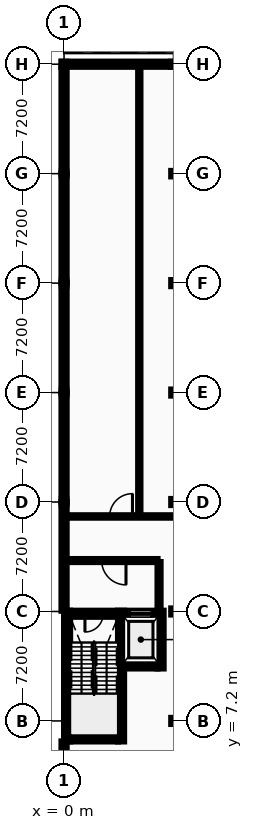
"""IFC4 building model, lengths in metres.
Left out: names, types, materials, properties, quantities, classifications, styles, units other than length and angle.
Written with IfcOpenShell. Run it as: python <this file> out.ifc"""

import sys

from ifc_helpers import new_model, si_unit, direction, frame, frame_2d, origin, origin_2d, place, context, subcontext, project, spatial, rectangle, i_section, extrude, element, fill, save


model = new_model("IFC4")
c1 = context("Model", 3, precision=1e-05, world=origin(), true_north=direction((0.0, 1.0)))
c2 = subcontext(c1, "Body", "Model", "MODEL_VIEW")
j1 = project(units=[si_unit("LENGTHUNIT", "METRE"), si_unit("PLANEANGLEUNIT", "RADIAN")], contexts=[c1])
p1 = place(None, origin())
s1 = spatial("IfcSite", under=j1, at=p1, CompositionType="ELEMENT")
p2 = place(p1, origin())
s2 = spatial("IfcBuilding", under=s1, at=p2, CompositionType="ELEMENT")
p3 = place(p2, frame((0.0, 0.0, 14.0)))
s3 = spatial("IfcBuildingStorey", under=s2, at=p3, CompositionType="ELEMENT", Elevation=14.0)
for number, where, z_axis, x_axis in (
    (1, (0.0, 21.6, 0.0), (0.0, 0.0, 1.0), (1.0, 0.0, 0.0)),
    (2, (0.0, 28.8, 0.0), (0.0, 0.0, 1.0), (1.0, 0.0, 0.0)),
    (3, (0.0, 36.0, 0.0), (0.0, 0.0, 1.0), (1.0, 0.0, 0.0)),
):
    element("IfcColumn", number, at=place(p3, frame(where, z_axis=z_axis, x_axis=x_axis)), inside=s3, PredefinedType="COLUMN", context=c2, shape_type="SweptSolid", body=[
        extrude(i_section(OverallWidth=0.3, OverallDepth=0.4, WebThickness=0.013, FlangeThickness=0.024, FilletRadius=0.027, at=origin_2d()), origin(), (0.0, 0.0, 1.0), 4.4),
    ])
p4 = place(p3, frame((0.0, 43.2, 0.0), z_axis=(0.0, 0.0, 1.0), x_axis=(1.0, 0.0, 0.0)))
e4 = element("IfcColumn", 4, at=p4, inside=s3, PredefinedType="COLUMN", context=c2, shape_type="SweptSolid", body=[
    extrude(i_section(OverallWidth=0.3, OverallDepth=0.36, WebThickness=0.012, FlangeThickness=0.022, FilletRadius=0.027, at=origin_2d()), origin(), (0.0, 0.0, 1.0), 4.4),
])
p5 = place(p3, frame((0.0, 50.4, 0.0), z_axis=(0.0, 0.0, 1.0), x_axis=(1.0, 0.0, 0.0)))
e5 = element("IfcColumn", 5, at=p5, inside=s3, PredefinedType="COLUMN", context=c2, shape_type="SweptSolid", body=[
    extrude(i_section(OverallWidth=0.3, OverallDepth=0.32, WebThickness=0.011, FlangeThickness=0.021, FilletRadius=0.027, at=origin_2d()), origin(), (0.0, 0.0, 1.0), 4.4),
])
for number, where, z_axis, x_axis in (
    (6, (7.2, 7.2, 0.0), (0.0, 0.0, 1.0), (1.0, 0.0, 0.0)),
    (7, (7.2, 14.4, 0.0), (0.0, 0.0, 1.0), (1.0, 0.0, 0.0)),
    (8, (7.2, 21.6, 0.0), (0.0, 0.0, 1.0), (1.0, 0.0, 0.0)),
    (9, (7.2, 28.8, 0.0), (0.0, 0.0, 1.0), (1.0, 0.0, 0.0)),
    (10, (7.2, 36.0, 0.0), (0.0, 0.0, 1.0), (1.0, 0.0, 0.0)),
):
    element("IfcColumn", number, at=place(p3, frame(where, z_axis=z_axis, x_axis=x_axis)), inside=s3, PredefinedType="COLUMN", context=c2, shape_type="SweptSolid", body=[
        extrude(i_section(OverallWidth=0.3, OverallDepth=0.4, WebThickness=0.013, FlangeThickness=0.024, FilletRadius=0.027, at=origin_2d()), origin(), (0.0, 0.0, 1.0), 4.4),
    ])
p6 = place(p3, frame((7.2, 43.2, 0.0), z_axis=(0.0, 0.0, 1.0), x_axis=(1.0, 0.0, 0.0)))
e11 = element("IfcColumn", 11, at=p6, inside=s3, PredefinedType="COLUMN", context=c2, shape_type="SweptSolid", body=[
    extrude(i_section(OverallWidth=0.3, OverallDepth=0.36, WebThickness=0.012, FlangeThickness=0.022, FilletRadius=0.027, at=origin_2d()), origin(), (0.0, 0.0, 1.0), 4.4),
])
p7 = place(p3, frame((7.2, 50.4, 0.0), z_axis=(0.0, 0.0, 1.0), x_axis=(1.0, 0.0, 0.0)))
e12 = element("IfcColumn", 12, at=p7, inside=s3, PredefinedType="COLUMN", context=c2, shape_type="SweptSolid", body=[
    extrude(i_section(OverallWidth=0.3, OverallDepth=0.32, WebThickness=0.011, FlangeThickness=0.021, FilletRadius=0.027, at=origin_2d()), origin(), (0.0, 0.0, 1.0), 4.4),
])
p8 = place(p3, frame((7.31, 50.4, 0.0), z_axis=(0.0, 0.0, 1.0), x_axis=(-1.0, 0.0, 0.0)))
e13 = element("IfcWall", 13, at=p8, inside=s3, PredefinedType="STANDARD", context=c2, shape_type="SweptSolid", body=[
    extrude(rectangle(XDim=7.48, YDim=0.34, at=frame_2d((3.74, 0.0))), origin(), (0.0, 0.0, 1.0), 3.935),
])
p9 = place(p8, frame((4.619, 0.0, 0.95)))
e14 = element("IfcOpeningElement", 14, at=p9, cuts=e13, PredefinedType="OPENING", context=c2, shape_type="SweptSolid", body=[
    extrude(rectangle(XDim=1.234, YDim=1.332, at=frame_2d((0.617, 0.666))), frame((0.0, 0.18, 0.0), z_axis=(0.0, -1.0, 0.0), x_axis=(1.0, 0.0, 0.0)), (0.0, 0.0, 1.0), 0.36),
])
p10 = place(p3, frame((0.0, 5.85, 0.0), z_axis=(0.0, 0.0, 1.0), x_axis=(0.0, -1.0, 0.0)))
e15 = element("IfcWall", 15, at=p10, inside=s3, PredefinedType="STANDARD", context=c2, shape_type="SweptSolid", body=[
    extrude(rectangle(XDim=5.68, YDim=0.34, at=frame_2d((2.84, 0.0))), origin(), (0.0, 0.0, 1.0), 4.2),
])
p11 = place(p10, frame((2.41, 0.0, 0.95)))
e16 = element("IfcOpeningElement", 16, at=p11, cuts=e15, PredefinedType="OPENING", context=c2, shape_type="SweptSolid", body=[
    extrude(rectangle(XDim=0.86, YDim=1.368, at=frame_2d((0.43, 0.684))), frame((0.0, 0.18, 0.0), z_axis=(0.0, -1.0, 0.0), x_axis=(1.0, 0.0, 0.0)), (0.0, 0.0, 1.0), 0.36),
])
p12 = place(p3, frame((0.0, 21.6, 0.0), z_axis=(0.0, 0.0, 1.0), x_axis=(0.0, -1.0, 0.0)))
e17 = element("IfcWall", 17, at=p12, inside=s3, PredefinedType="STANDARD", context=c2, shape_type="SweptSolid", body=[
    extrude(rectangle(XDim=7.15, YDim=0.34, at=frame_2d((3.575, 0.0))), origin(), (0.0, 0.0, 1.0), 4.2),
])
p13 = place(p12, frame((1.698, 0.0, 0.95)))
e18 = element("IfcOpeningElement", 18, at=p13, cuts=e17, PredefinedType="OPENING", context=c2, shape_type="SweptSolid", body=[
    extrude(rectangle(XDim=0.894, YDim=1.368, at=frame_2d((0.447, 0.684))), frame((0.0, 0.18, 0.0), z_axis=(0.0, -1.0, 0.0), x_axis=(1.0, 0.0, 0.0)), (0.0, 0.0, 1.0), 0.36),
])
p14 = place(p12, frame((4.558, 0.0, 0.95)))
e19 = element("IfcOpeningElement", 19, at=p14, cuts=e17, PredefinedType="OPENING", context=c2, shape_type="SweptSolid", body=[
    extrude(rectangle(XDim=0.894, YDim=1.368, at=frame_2d((0.447, 0.684))), frame((0.0, 0.18, 0.0), z_axis=(0.0, -1.0, 0.0), x_axis=(1.0, 0.0, 0.0)), (0.0, 0.0, 1.0), 0.36),
])
p15 = place(p3, frame((0.0, 28.8, 0.0), z_axis=(0.0, 0.0, 1.0), x_axis=(0.0, -1.0, 0.0)))
e20 = element("IfcWall", 20, at=p15, inside=s3, PredefinedType="STANDARD", context=c2, shape_type="SweptSolid", body=[
    extrude(rectangle(XDim=7.2, YDim=0.34, at=frame_2d((3.6, 0.0))), origin(), (0.0, 0.0, 1.0), 3.885),
])
p16 = place(p15, frame((1.696, 0.0, 0.95)))
e21 = element("IfcOpeningElement", 21, at=p16, cuts=e20, PredefinedType="OPENING", context=c2, shape_type="SweptSolid", body=[
    extrude(rectangle(XDim=0.928, YDim=1.368, at=frame_2d((0.464, 0.684))), frame((0.0, 0.18, 0.0), z_axis=(0.0, -1.0, 0.0), x_axis=(1.0, 0.0, 0.0)), (0.0, 0.0, 1.0), 0.36),
])
p17 = place(p15, frame((4.576, 0.0, 0.95)))
e22 = element("IfcOpeningElement", 22, at=p17, cuts=e20, PredefinedType="OPENING", context=c2, shape_type="SweptSolid", body=[
    extrude(rectangle(XDim=0.928, YDim=1.368, at=frame_2d((0.464, 0.684))), frame((0.0, 0.18, 0.0), z_axis=(0.0, -1.0, 0.0), x_axis=(1.0, 0.0, 0.0)), (0.0, 0.0, 1.0), 0.36),
])
p18 = place(p3, frame((0.0, 36.0, 0.0), z_axis=(0.0, 0.0, 1.0), x_axis=(0.0, -1.0, 0.0)))
e23 = element("IfcWall", 23, at=p18, inside=s3, PredefinedType="STANDARD", context=c2, shape_type="SweptSolid", body=[
    extrude(rectangle(XDim=7.2, YDim=0.34, at=frame_2d((3.6, 0.0))), origin(), (0.0, 0.0, 1.0), 3.885),
])
p19 = place(p18, frame((1.679, 0.0, 0.95)))
e24 = element("IfcOpeningElement", 24, at=p19, cuts=e23, PredefinedType="OPENING", context=c2, shape_type="SweptSolid", body=[
    extrude(rectangle(XDim=0.962, YDim=1.368, at=frame_2d((0.481, 0.684))), frame((0.0, 0.18, 0.0), z_axis=(0.0, -1.0, 0.0), x_axis=(1.0, 0.0, 0.0)), (0.0, 0.0, 1.0), 0.36),
])
p20 = place(p18, frame((4.559, 0.0, 0.95)))
e25 = element("IfcOpeningElement", 25, at=p20, cuts=e23, PredefinedType="OPENING", context=c2, shape_type="SweptSolid", body=[
    extrude(rectangle(XDim=0.962, YDim=1.368, at=frame_2d((0.481, 0.684))), frame((0.0, 0.18, 0.0), z_axis=(0.0, -1.0, 0.0), x_axis=(1.0, 0.0, 0.0)), (0.0, 0.0, 1.0), 0.36),
])
p21 = place(p3, frame((0.0, 43.2, 0.0), z_axis=(0.0, 0.0, 1.0), x_axis=(0.0, -1.0, 0.0)))
e26 = element("IfcWall", 26, at=p21, inside=s3, PredefinedType="STANDARD", context=c2, shape_type="SweptSolid", body=[
    extrude(rectangle(XDim=7.2, YDim=0.34, at=frame_2d((3.6, 0.0))), origin(), (0.0, 0.0, 1.0), 3.885),
])
p22 = place(p21, frame((1.662, 0.0, 0.95)))
e27 = element("IfcOpeningElement", 27, at=p22, cuts=e26, PredefinedType="OPENING", context=c2, shape_type="SweptSolid", body=[
    extrude(rectangle(XDim=0.996, YDim=1.368, at=frame_2d((0.498, 0.684))), frame((0.0, 0.18, 0.0), z_axis=(0.0, -1.0, 0.0), x_axis=(1.0, 0.0, 0.0)), (0.0, 0.0, 1.0), 0.36),
])
p23 = place(p21, frame((4.542, 0.0, 0.95)))
e28 = element("IfcOpeningElement", 28, at=p23, cuts=e26, PredefinedType="OPENING", context=c2, shape_type="SweptSolid", body=[
    extrude(rectangle(XDim=0.996, YDim=1.368, at=frame_2d((0.498, 0.684))), frame((0.0, 0.18, 0.0), z_axis=(0.0, -1.0, 0.0), x_axis=(1.0, 0.0, 0.0)), (0.0, 0.0, 1.0), 0.36),
])
p24 = place(p3, frame((0.0, 50.23, 0.0), z_axis=(0.0, 0.0, 1.0), x_axis=(0.0, -1.0, 0.0)))
e29 = element("IfcWall", 29, at=p24, inside=s3, PredefinedType="STANDARD", context=c2, shape_type="SweptSolid", body=[
    extrude(rectangle(XDim=7.03, YDim=0.34, at=frame_2d((3.515, 0.0))), origin(), (0.0, 0.0, 1.0), 3.885),
])
p25 = place(p24, frame((1.594, 0.0, 0.95)))
e30 = element("IfcOpeningElement", 30, at=p25, cuts=e29, PredefinedType="OPENING", context=c2, shape_type="SweptSolid", body=[
    extrude(rectangle(XDim=1.03, YDim=1.368, at=frame_2d((0.515, 0.684))), frame((0.0, 0.18, 0.0), z_axis=(0.0, -1.0, 0.0), x_axis=(1.0, 0.0, 0.0)), (0.0, 0.0, 1.0), 0.36),
])
p26 = place(p24, frame((4.406, 0.0, 0.95)))
e31 = element("IfcOpeningElement", 31, at=p26, cuts=e29, PredefinedType="OPENING", context=c2, shape_type="SweptSolid", body=[
    extrude(rectangle(XDim=1.03, YDim=1.368, at=frame_2d((0.515, 0.684))), frame((0.0, 0.18, 0.0), z_axis=(0.0, -1.0, 0.0), x_axis=(1.0, 0.0, 0.0)), (0.0, 0.0, 1.0), 0.36),
])
p27 = place(p3, frame((0.4, 6.05, 0.0), z_axis=(0.0, 0.0, 1.0), x_axis=(1.0, 0.0, 0.0)))
e32 = element("IfcWall", 32, at=p27, inside=s3, PredefinedType="SHEAR", context=c2, shape_type="SweptSolid", body=[
    extrude(rectangle(XDim=3.15, YDim=0.4, at=frame_2d((1.575, 0.0))), origin(), (0.0, 0.0, 1.0), 4.2),
])
p28 = place(p3, frame((0.4, 14.25, 0.0), z_axis=(0.0, 0.0, 1.0), x_axis=(1.0, 0.0, 0.0)))
e33 = element("IfcWall", 33, at=p28, inside=s3, PredefinedType="SHEAR", context=c2, shape_type="SweptSolid", body=[
    extrude(rectangle(XDim=3.15, YDim=0.4, at=frame_2d((1.575, 0.0))), origin(), (0.0, 0.0, 1.0), 4.2),
])
p29 = place(p28, frame((0.975, 0.0, 0.0)))
e34 = element("IfcOpeningElement", 34, at=p29, cuts=e33, PredefinedType="OPENING", context=c2, shape_type="SweptSolid", body=[
    extrude(rectangle(XDim=1.2, YDim=2.15, at=frame_2d((0.6, 1.075))), frame((0.0, 0.21, 0.0), z_axis=(0.0, -1.0, 0.0), x_axis=(1.0, 0.0, 0.0)), (0.0, 0.0, 1.0), 0.42),
])
for number, where, z_axis, x_axis in (
    (35, (0.2, 5.85, 0.0), (0.0, 0.0, 1.0), (0.0, 1.0, 0.0)),
    (36, (3.75, 5.85, 0.0), (0.0, 0.0, 1.0), (0.0, 1.0, 0.0)),
):
    element("IfcWall", number, at=place(p3, frame(where, z_axis=z_axis, x_axis=x_axis)), inside=s3, PredefinedType="SHEAR", context=c2, shape_type="SweptSolid", body=[
        extrude(rectangle(XDim=8.6, YDim=0.4, at=frame_2d((4.3, 0.0))), origin(), (0.0, 0.0, 1.0), 4.2),
    ])
p30 = place(p3, frame((3.95, 10.85, 0.0), z_axis=(0.0, 0.0, 1.0), x_axis=(1.0, 0.0, 0.0)))
e37 = element("IfcWall", 37, at=p30, inside=s3, PredefinedType="SHEAR", context=c2, shape_type="SweptSolid", body=[
    extrude(rectangle(XDim=2.2, YDim=0.4, at=frame_2d((1.1, 0.0))), origin(), (0.0, 0.0, 1.0), 4.2),
])
p31 = place(p3, frame((3.95, 14.25, 0.0), z_axis=(0.0, 0.0, 1.0), x_axis=(1.0, 0.0, 0.0)))
e38 = element("IfcWall", 38, at=p31, inside=s3, PredefinedType="SHEAR", context=c2, shape_type="SweptSolid", body=[
    extrude(rectangle(XDim=2.2, YDim=0.4, at=frame_2d((1.1, 0.0))), origin(), (0.0, 0.0, 1.0), 4.2),
])
p32 = place(p31, frame((0.4, 0.0, 0.0)))
e39 = element("IfcOpeningElement", 39, at=p32, cuts=e38, PredefinedType="OPENING", context=c2, shape_type="SweptSolid", body=[
    extrude(rectangle(XDim=1.4, YDim=2.2, at=frame_2d((0.7, 1.1))), frame((0.0, 0.21, 0.0), z_axis=(0.0, -1.0, 0.0), x_axis=(1.0, 0.0, 0.0)), (0.0, 0.0, 1.0), 0.42),
])
p33 = place(p3, frame((6.35, 10.65, 0.0), z_axis=(0.0, 0.0, 1.0), x_axis=(0.0, 1.0, 0.0)))
e40 = element("IfcWall", 40, at=p33, inside=s3, PredefinedType="SHEAR", context=c2, shape_type="SweptSolid", body=[
    extrude(rectangle(XDim=3.8, YDim=0.4, at=frame_2d((1.9, 0.0))), origin(), (0.0, 0.0, 1.0), 4.2),
])
p34 = place(p3, frame((0.4, 17.75, 0.0), z_axis=(0.0, 0.0, 1.0), x_axis=(1.0, 0.0, 0.0)))
e41 = element("IfcWall", 41, at=p34, inside=s3, PredefinedType="PARTITIONING", context=c2, shape_type="SweptSolid", body=[
    extrude(rectangle(XDim=5.75, YDim=0.2, at=frame_2d((2.875, 0.0))), origin(), (0.0, 0.0, 1.0), 4.2),
])
p35 = place(p34, frame((2.075, 0.0, 0.0)))
e42 = element("IfcOpeningElement", 42, at=p35, cuts=e41, PredefinedType="OPENING", context=c2, shape_type="SweptSolid", body=[
    extrude(rectangle(XDim=1.6, YDim=2.2, at=frame_2d((0.8, 1.1))), frame((0.0, 0.11, 0.0), z_axis=(0.0, -1.0, 0.0), x_axis=(1.0, 0.0, 0.0)), (0.0, 0.0, 1.0), 0.22),
])
p36 = place(p3, frame((6.25, 14.45, 0.0), z_axis=(0.0, 0.0, 1.0), x_axis=(0.0, 1.0, 0.0)))
e43 = element("IfcWall", 43, at=p36, inside=s3, PredefinedType="PARTITIONING", context=c2, shape_type="SweptSolid", body=[
    extrude(rectangle(XDim=3.2, YDim=0.2, at=frame_2d((1.6, 0.0))), origin(), (0.0, 0.0, 1.0), 4.2),
])
p37 = place(p3, frame((0.2, 20.65, 0.0), z_axis=(0.0, 0.0, 1.0), x_axis=(1.0, 0.0, 0.0)))
e44 = element("IfcWall", 44, at=p37, inside=s3, PredefinedType="PARTITIONING", context=c2, shape_type="SweptSolid", body=[
    extrude(rectangle(XDim=13.9, YDim=0.16, at=frame_2d((6.95, 0.0))), origin(), (0.0, 0.0, 1.0), 4.2),
])
p38 = place(p37, frame((2.8, 0.0, 0.0)))
e45 = element("IfcOpeningElement", 45, at=p38, cuts=e44, PredefinedType="OPENING", context=c2, shape_type="SweptSolid", body=[
    extrude(rectangle(XDim=1.5, YDim=2.2, at=frame_2d((0.75, 1.1))), frame((0.0, 0.09, 0.0), z_axis=(0.0, -1.0, 0.0), x_axis=(1.0, 0.0, 0.0)), (0.0, 0.0, 1.0), 0.18),
])
p39 = place(p37, frame((8.575, 0.0, 0.0)))
e46 = element("IfcOpeningElement", 46, at=p39, cuts=e44, PredefinedType="OPENING", context=c2, shape_type="SweptSolid", body=[
    extrude(rectangle(XDim=1.5, YDim=2.2, at=frame_2d((0.75, 1.1))), frame((0.0, 0.09, 0.0), z_axis=(0.0, -1.0, 0.0), x_axis=(1.0, 0.0, 0.0)), (0.0, 0.0, 1.0), 0.18),
])
p40 = place(p3, frame((4.95, 20.73, 0.0), z_axis=(0.0, 0.0, 1.0), x_axis=(0.0, 1.0, 0.0)))
e47 = element("IfcWall", 47, at=p40, inside=s3, PredefinedType="PARTITIONING", context=c2, shape_type="SweptSolid", body=[
    extrude(rectangle(XDim=29.47, YDim=0.15, at=frame_2d((14.735, 0.0))), origin(), (0.0, 0.0, 1.0), 3.945),
])
p41 = place(p9, origin())
e48 = element("IfcWindow", 48, at=p41, inside=s3, PartitioningType="SINGLE_PANEL", PredefinedType="WINDOW", context=c2, shape_type="SweptSolid", body=[
    extrude(rectangle(XDim=1.234, YDim=1.332, at=frame_2d((0.617, 0.666))), frame((0.0, 0.03, 0.0), z_axis=(0.0, -1.0, 0.0), x_axis=(1.0, 0.0, 0.0)), (0.0, 0.0, 1.0), 0.06),
])
fill(e14, e48)
p42 = place(p13, origin())
e49 = element("IfcWindow", 49, at=p42, inside=s3, PartitioningType="SINGLE_PANEL", PredefinedType="WINDOW", context=c2, shape_type="SweptSolid", body=[
    extrude(rectangle(XDim=0.894, YDim=1.368, at=frame_2d((0.447, 0.684))), frame((0.0, 0.03, 0.0), z_axis=(0.0, -1.0, 0.0), x_axis=(1.0, 0.0, 0.0)), (0.0, 0.0, 1.0), 0.06),
])
fill(e18, e49)
p43 = place(p14, origin())
e50 = element("IfcWindow", 50, at=p43, inside=s3, PartitioningType="SINGLE_PANEL", PredefinedType="WINDOW", context=c2, shape_type="SweptSolid", body=[
    extrude(rectangle(XDim=0.894, YDim=1.368, at=frame_2d((0.447, 0.684))), frame((0.0, 0.03, 0.0), z_axis=(0.0, -1.0, 0.0), x_axis=(1.0, 0.0, 0.0)), (0.0, 0.0, 1.0), 0.06),
])
fill(e19, e50)
p44 = place(p16, origin())
e51 = element("IfcWindow", 51, at=p44, inside=s3, PartitioningType="SINGLE_PANEL", PredefinedType="WINDOW", context=c2, shape_type="SweptSolid", body=[
    extrude(rectangle(XDim=0.928, YDim=1.368, at=frame_2d((0.464, 0.684))), frame((0.0, 0.03, 0.0), z_axis=(0.0, -1.0, 0.0), x_axis=(1.0, 0.0, 0.0)), (0.0, 0.0, 1.0), 0.06),
])
fill(e21, e51)
p45 = place(p17, origin())
e52 = element("IfcWindow", 52, at=p45, inside=s3, PartitioningType="SINGLE_PANEL", PredefinedType="WINDOW", context=c2, shape_type="SweptSolid", body=[
    extrude(rectangle(XDim=0.928, YDim=1.368, at=frame_2d((0.464, 0.684))), frame((0.0, 0.03, 0.0), z_axis=(0.0, -1.0, 0.0), x_axis=(1.0, 0.0, 0.0)), (0.0, 0.0, 1.0), 0.06),
])
fill(e22, e52)
p46 = place(p19, origin())
e53 = element("IfcWindow", 53, at=p46, inside=s3, PartitioningType="SINGLE_PANEL", PredefinedType="WINDOW", context=c2, shape_type="SweptSolid", body=[
    extrude(rectangle(XDim=0.962, YDim=1.368, at=frame_2d((0.481, 0.684))), frame((0.0, 0.03, 0.0), z_axis=(0.0, -1.0, 0.0), x_axis=(1.0, 0.0, 0.0)), (0.0, 0.0, 1.0), 0.06),
])
fill(e24, e53)
p47 = place(p20, origin())
e54 = element("IfcWindow", 54, at=p47, inside=s3, PartitioningType="SINGLE_PANEL", PredefinedType="WINDOW", context=c2, shape_type="SweptSolid", body=[
    extrude(rectangle(XDim=0.962, YDim=1.368, at=frame_2d((0.481, 0.684))), frame((0.0, 0.03, 0.0), z_axis=(0.0, -1.0, 0.0), x_axis=(1.0, 0.0, 0.0)), (0.0, 0.0, 1.0), 0.06),
])
fill(e25, e54)
p48 = place(p22, origin())
e55 = element("IfcWindow", 55, at=p48, inside=s3, PartitioningType="SINGLE_PANEL", PredefinedType="WINDOW", context=c2, shape_type="SweptSolid", body=[
    extrude(rectangle(XDim=0.996, YDim=1.368, at=frame_2d((0.498, 0.684))), frame((0.0, 0.03, 0.0), z_axis=(0.0, -1.0, 0.0), x_axis=(1.0, 0.0, 0.0)), (0.0, 0.0, 1.0), 0.06),
])
fill(e27, e55)
p49 = place(p23, origin())
e56 = element("IfcWindow", 56, at=p49, inside=s3, PartitioningType="SINGLE_PANEL", PredefinedType="WINDOW", context=c2, shape_type="SweptSolid", body=[
    extrude(rectangle(XDim=0.996, YDim=1.368, at=frame_2d((0.498, 0.684))), frame((0.0, 0.03, 0.0), z_axis=(0.0, -1.0, 0.0), x_axis=(1.0, 0.0, 0.0)), (0.0, 0.0, 1.0), 0.06),
])
fill(e28, e56)
p50 = place(p25, origin())
e57 = element("IfcWindow", 57, at=p50, inside=s3, PartitioningType="SINGLE_PANEL", PredefinedType="WINDOW", context=c2, shape_type="SweptSolid", body=[
    extrude(rectangle(XDim=1.03, YDim=1.368, at=frame_2d((0.515, 0.684))), frame((0.0, 0.03, 0.0), z_axis=(0.0, -1.0, 0.0), x_axis=(1.0, 0.0, 0.0)), (0.0, 0.0, 1.0), 0.06),
])
fill(e30, e57)
p51 = place(p26, origin())
e58 = element("IfcWindow", 58, at=p51, inside=s3, PartitioningType="SINGLE_PANEL", PredefinedType="WINDOW", context=c2, shape_type="SweptSolid", body=[
    extrude(rectangle(XDim=1.03, YDim=1.368, at=frame_2d((0.515, 0.684))), frame((0.0, 0.03, 0.0), z_axis=(0.0, -1.0, 0.0), x_axis=(1.0, 0.0, 0.0)), (0.0, 0.0, 1.0), 0.06),
])
fill(e31, e58)
p52 = place(p29, frame((1.2, 0.0, 0.0), z_axis=(0.0, 0.0, 1.0), x_axis=(-1.0, 0.0, 0.0)))
e59 = element("IfcDoor", 59, at=p52, inside=s3, OperationType="SINGLE_SWING_LEFT", PredefinedType="DOOR", context=c2, shape_type="SweptSolid", body=[
    extrude(rectangle(XDim=1.2, YDim=2.15, at=frame_2d((0.6, 1.075))), frame((0.0, 0.025, 0.0), z_axis=(0.0, -1.0, 0.0), x_axis=(1.0, 0.0, 0.0)), (0.0, 0.0, 1.0), 0.05),
])
fill(e34, e59)
p53 = place(p32, origin())
e60 = element("IfcDoor", 60, at=p53, inside=s3, OperationType="SLIDING_TO_LEFT", PredefinedType="DOOR", context=c2, shape_type="SweptSolid", body=[
    extrude(rectangle(XDim=1.4, YDim=2.2, at=frame_2d((0.7, 1.1))), frame((0.0, 0.025, 0.0), z_axis=(0.0, -1.0, 0.0), x_axis=(1.0, 0.0, 0.0)), (0.0, 0.0, 1.0), 0.05),
])
fill(e39, e60)
p54 = place(p35, origin())
e61 = element("IfcDoor", 61, at=p54, inside=s3, OperationType="DOUBLE_DOOR_SINGLE_SWING", PredefinedType="DOOR", context=c2, shape_type="SweptSolid", body=[
    extrude(rectangle(XDim=1.6, YDim=2.2, at=frame_2d((0.8, 1.1))), frame((0.0, 0.025, 0.0), z_axis=(0.0, -1.0, 0.0), x_axis=(1.0, 0.0, 0.0)), (0.0, 0.0, 1.0), 0.05),
])
fill(e42, e61)
p55 = place(p38, frame((1.5, 0.0, 0.0), z_axis=(0.0, 0.0, 1.0), x_axis=(-1.0, 0.0, 0.0)))
e62 = element("IfcDoor", 62, at=p55, inside=s3, OperationType="DOUBLE_DOOR_SINGLE_SWING", PredefinedType="DOOR", context=c2, shape_type="SweptSolid", body=[
    extrude(rectangle(XDim=1.5, YDim=2.2, at=frame_2d((0.75, 1.1))), frame((0.0, 0.025, 0.0), z_axis=(0.0, -1.0, 0.0), x_axis=(1.0, 0.0, 0.0)), (0.0, 0.0, 1.0), 0.05),
])
fill(e45, e62)
save(model, sys.argv[1])
